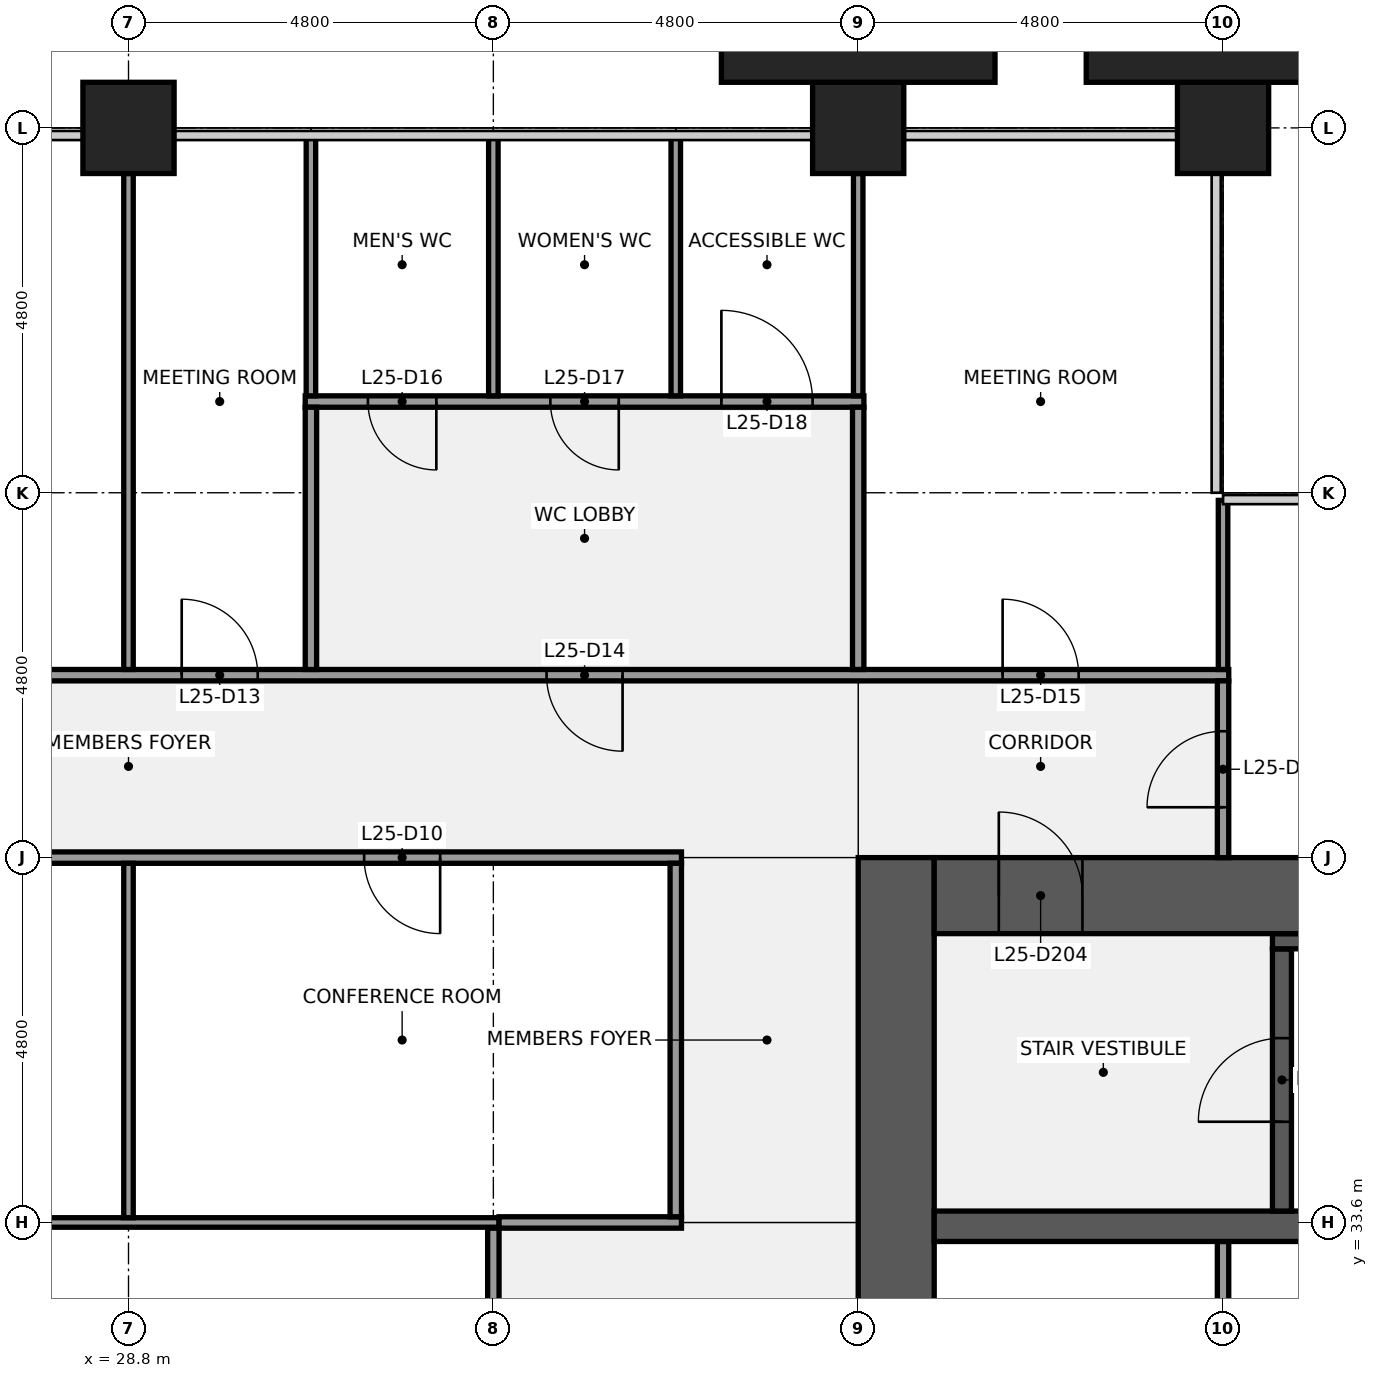
"""IFC4 building model, lengths in metres.
Left out: names, types, materials, properties, quantities, classifications, styles, units other than length and angle.
Written with IfcOpenShell. Run it as: python <this file> out.ifc"""

import sys

from ifc_helpers import new_model, si_unit, direction, frame, frame_2d, origin, origin_2d, place, context, subcontext, project, spatial, rectangle, extrude, element, fill, save


model = new_model("IFC4")
c1 = context("Model", 3, precision=1e-05, world=origin(), true_north=direction((0.0, 1.0)))
c2 = subcontext(c1, "Body", "Model", "MODEL_VIEW")
j1 = project(units=[si_unit("LENGTHUNIT", "METRE"), si_unit("PLANEANGLEUNIT", "RADIAN")], contexts=[c1])
p1 = place(None, origin())
s1 = spatial("IfcSite", under=j1, at=p1, CompositionType="ELEMENT")
p2 = place(p1, origin())
s2 = spatial("IfcBuilding", under=s1, at=p2, CompositionType="ELEMENT")
p3 = place(p2, frame((0.0, 0.0, 120.1)))
s3 = spatial("IfcBuildingStorey", under=s2, at=p3, CompositionType="ELEMENT", Elevation=120.1)
for number, where, z_axis, x_axis in (
    (1, (28.8, 48.0, 0.0), (0.0, 0.0, 1.0), (1.0, 0.0, 0.0)),
    (2, (38.4, 48.0, 0.0), (0.0, 0.0, 1.0), (1.0, 0.0, 0.0)),
    (3, (43.2, 48.0, 0.0), (0.0, 0.0, 1.0), (1.0, 0.0, 0.0)),
):
    element("IfcColumn", number, at=place(p3, frame(where, z_axis=z_axis, x_axis=x_axis)), inside=s3, PredefinedType="COLUMN", context=c2, shape_type="SweptSolid", body=[
        extrude(rectangle(XDim=1.2, YDim=1.2, at=origin_2d()), origin(), (0.0, 0.0, 1.0), 4.0),
    ])
p4 = place(p3, frame((38.9, 9.6, 0.0), z_axis=(0.0, 0.0, 1.0), x_axis=(0.0, 1.0, 0.0)))
e4 = element("IfcWall", 4, at=p4, inside=s3, PredefinedType="SHEAR", context=c2, shape_type="SweptSolid", body=[
    extrude(rectangle(XDim=28.8, YDim=1.0, at=frame_2d((14.4, 0.0))), origin(), (0.0, 0.0, 1.0), 3.84),
])
p5 = place(p4, frame((8.7, 0.0, 0.0)))
e5 = element("IfcOpeningElement", 5, at=p5, cuts=e4, PredefinedType="OPENING", context=c2, shape_type="SweptSolid", body=[
    extrude(rectangle(XDim=1.8, YDim=2.1, at=frame_2d((0.9, 1.05))), frame((0.0, 0.51, 0.0), z_axis=(0.0, -1.0, 0.0), x_axis=(1.0, 0.0, 0.0)), (0.0, 0.0, 1.0), 1.02),
])
p6 = place(p4, frame((18.3, 0.0, 0.0)))
e6 = element("IfcOpeningElement", 6, at=p6, cuts=e4, PredefinedType="OPENING", context=c2, shape_type="SweptSolid", body=[
    extrude(rectangle(XDim=1.8, YDim=2.1, at=frame_2d((0.9, 1.05))), frame((0.0, 0.51, 0.0), z_axis=(0.0, -1.0, 0.0), x_axis=(1.0, 0.0, 0.0)), (0.0, 0.0, 1.0), 1.02),
])
p7 = place(p3, frame((43.2, 30.75, 0.0), z_axis=(0.0, 0.0, 1.0), x_axis=(0.0, 1.0, 0.0)))
e7 = element("IfcWall", 7, at=p7, inside=s3, PredefinedType="PARTITIONING", context=c2, shape_type="SweptSolid", body=[
    extrude(rectangle(XDim=2.6, YDim=0.15, at=frame_2d((1.3, 0.0))), origin(), (0.0, 0.0, 1.0), 3.84),
])
p8 = place(p3, frame((39.4, 33.55, 0.0), z_axis=(0.0, 0.0, 1.0), x_axis=(1.0, 0.0, 0.0)))
e8 = element("IfcWall", 8, at=p8, inside=s3, PredefinedType="SHEAR", context=c2, shape_type="SweptSolid", body=[
    extrude(rectangle(XDim=17.2, YDim=0.4, at=frame_2d((8.6, 0.0))), origin(), (0.0, 0.0, 1.0), 3.84),
])
p9 = place(p3, frame((43.975, 33.75, 0.0), z_axis=(0.0, 0.0, 1.0), x_axis=(0.0, 1.0, 0.0)))
e9 = element("IfcWall", 9, at=p9, inside=s3, PredefinedType="SHEAR", context=c2, shape_type="SweptSolid", body=[
    extrude(rectangle(XDim=3.45, YDim=0.25, at=frame_2d((1.725, 0.0))), origin(), (0.0, 0.0, 1.0), 3.84),
])
p10 = place(p9, frame((1.175, 0.0, 0.0)))
e10 = element("IfcOpeningElement", 10, at=p10, cuts=e9, PredefinedType="OPENING", context=c2, shape_type="SweptSolid", body=[
    extrude(rectangle(XDim=1.1, YDim=2.1, at=frame_2d((0.55, 1.05))), frame((0.0, 0.135, 0.0), z_axis=(0.0, -1.0, 0.0), x_axis=(1.0, 0.0, 0.0)), (0.0, 0.0, 1.0), 0.27),
])
p11 = place(p3, frame((43.85, 37.3, 0.0), z_axis=(0.0, 0.0, 1.0), x_axis=(1.0, 0.0, 0.0)))
e11 = element("IfcWall", 11, at=p11, inside=s3, PredefinedType="SHEAR", context=c2, shape_type="SweptSolid", body=[
    extrude(rectangle(XDim=7.5, YDim=0.2, at=frame_2d((3.75, 0.0))), origin(), (0.0, 0.0, 1.0), 3.84),
])
p12 = place(p3, frame((39.4, 37.9, 0.0), z_axis=(0.0, 0.0, 1.0), x_axis=(1.0, 0.0, 0.0)))
e12 = element("IfcWall", 12, at=p12, inside=s3, PredefinedType="SHEAR", context=c2, shape_type="SweptSolid", body=[
    extrude(rectangle(XDim=13.4, YDim=1.0, at=frame_2d((6.7, 0.0))), origin(), (0.0, 0.0, 1.0), 3.84),
])
p13 = place(p12, frame((0.85, 0.0, 0.0)))
e13 = element("IfcOpeningElement", 13, at=p13, cuts=e12, PredefinedType="OPENING", context=c2, shape_type="SweptSolid", body=[
    extrude(rectangle(XDim=1.1, YDim=2.1, at=frame_2d((0.55, 1.05))), frame((0.0, 0.51, 0.0), z_axis=(0.0, -1.0, 0.0), x_axis=(1.0, 0.0, 0.0)), (0.0, 0.0, 1.0), 1.02),
])
p14 = place(p3, frame((24.075, 33.6, 0.0), z_axis=(0.0, 0.0, 1.0), x_axis=(1.0, 0.0, 0.0)))
e14 = element("IfcWall", 14, at=p14, inside=s3, PredefinedType="PARTITIONING", context=c2, shape_type="SweptSolid", body=[
    extrude(rectangle(XDim=9.6, YDim=0.125, at=frame_2d((4.8, 0.0))), origin(), (0.0, 0.0, 1.0), 2.936),
])
p15 = place(p3, frame((33.675, 33.6, 0.0), z_axis=(0.0, 0.0, 1.0), x_axis=(1.0, 0.0, 0.0)))
e15 = element("IfcWall", 15, at=p15, inside=s3, PredefinedType="PARTITIONING", context=c2, shape_type="SweptSolid", body=[
    extrude(rectangle(XDim=2.4, YDim=0.15, at=frame_2d((1.2, 0.0))), origin(), (0.0, 0.0, 1.0), 2.936),
])
p16 = place(p3, frame((21.525, 38.4, 0.0), z_axis=(0.0, 0.0, 1.0), x_axis=(1.0, 0.0, 0.0)))
e16 = element("IfcWall", 16, at=p16, inside=s3, PredefinedType="PARTITIONING", context=c2, shape_type="SweptSolid", body=[
    extrude(rectangle(XDim=14.55, YDim=0.15, at=frame_2d((7.275, 0.0))), origin(), (0.0, 0.0, 1.0), 2.936),
])
p17 = place(p16, frame((3.175, 0.0, 0.0)))
e17 = element("IfcOpeningElement", 17, at=p17, cuts=e16, PredefinedType="OPENING", context=c2, shape_type="SweptSolid", body=[
    extrude(rectangle(XDim=1.0, YDim=2.1, at=frame_2d((0.5, 1.05))), frame((0.0, 0.085, 0.0), z_axis=(0.0, -1.0, 0.0), x_axis=(1.0, 0.0, 0.0)), (0.0, 0.0, 1.0), 0.17),
])
p18 = place(p16, frame((10.375, 0.0, 0.0)))
e18 = element("IfcOpeningElement", 18, at=p18, cuts=e16, PredefinedType="OPENING", context=c2, shape_type="SweptSolid", body=[
    extrude(rectangle(XDim=1.0, YDim=2.1, at=frame_2d((0.5, 1.05))), frame((0.0, 0.085, 0.0), z_axis=(0.0, -1.0, 0.0), x_axis=(1.0, 0.0, 0.0)), (0.0, 0.0, 1.0), 0.17),
])
p19 = place(p3, frame((14.325, 40.8, 0.0), z_axis=(0.0, 0.0, 1.0), x_axis=(1.0, 0.0, 0.0)))
e19 = element("IfcWall", 19, at=p19, inside=s3, PredefinedType="PARTITIONING", context=c2, shape_type="SweptSolid", body=[
    extrude(rectangle(XDim=28.95, YDim=0.15, at=frame_2d((14.475, 0.0))), origin(), (0.0, 0.0, 1.0), 2.936),
])
p20 = place(p19, frame((1.975, 0.0, 0.0)))
e20 = element("IfcOpeningElement", 20, at=p20, cuts=e19, PredefinedType="OPENING", context=c2, shape_type="SweptSolid", body=[
    extrude(rectangle(XDim=1.0, YDim=2.1, at=frame_2d((0.5, 1.05))), frame((0.0, 0.085, 0.0), z_axis=(0.0, -1.0, 0.0), x_axis=(1.0, 0.0, 0.0)), (0.0, 0.0, 1.0), 0.17),
])
p21 = place(p19, frame((9.175, 0.0, 0.0)))
e21 = element("IfcOpeningElement", 21, at=p21, cuts=e19, PredefinedType="OPENING", context=c2, shape_type="SweptSolid", body=[
    extrude(rectangle(XDim=1.0, YDim=2.1, at=frame_2d((0.5, 1.05))), frame((0.0, 0.085, 0.0), z_axis=(0.0, -1.0, 0.0), x_axis=(1.0, 0.0, 0.0)), (0.0, 0.0, 1.0), 0.17),
])
p22 = place(p19, frame((15.175, 0.0, 0.0)))
e22 = element("IfcOpeningElement", 22, at=p22, cuts=e19, PredefinedType="OPENING", context=c2, shape_type="SweptSolid", body=[
    extrude(rectangle(XDim=1.0, YDim=2.1, at=frame_2d((0.5, 1.05))), frame((0.0, 0.085, 0.0), z_axis=(0.0, -1.0, 0.0), x_axis=(1.0, 0.0, 0.0)), (0.0, 0.0, 1.0), 0.17),
])
p23 = place(p19, frame((19.975, 0.0, 0.0)))
e23 = element("IfcOpeningElement", 23, at=p23, cuts=e19, PredefinedType="OPENING", context=c2, shape_type="SweptSolid", body=[
    extrude(rectangle(XDim=1.0, YDim=2.1, at=frame_2d((0.5, 1.05))), frame((0.0, 0.085, 0.0), z_axis=(0.0, -1.0, 0.0), x_axis=(1.0, 0.0, 0.0)), (0.0, 0.0, 1.0), 0.17),
])
p24 = place(p19, frame((25.975, 0.0, 0.0)))
e24 = element("IfcOpeningElement", 24, at=p24, cuts=e19, PredefinedType="OPENING", context=c2, shape_type="SweptSolid", body=[
    extrude(rectangle(XDim=1.0, YDim=2.1, at=frame_2d((0.5, 1.05))), frame((0.0, 0.085, 0.0), z_axis=(0.0, -1.0, 0.0), x_axis=(1.0, 0.0, 0.0)), (0.0, 0.0, 1.0), 0.17),
])
p25 = place(p3, frame((31.125, 44.4, 0.0), z_axis=(0.0, 0.0, 1.0), x_axis=(1.0, 0.0, 0.0)))
e25 = element("IfcWall", 25, at=p25, inside=s3, PredefinedType="PARTITIONING", context=c2, shape_type="SweptSolid", body=[
    extrude(rectangle(XDim=7.35, YDim=0.15, at=frame_2d((3.675, 0.0))), origin(), (0.0, 0.0, 1.0), 2.936),
])
p26 = place(p25, frame((0.825, 0.0, 0.0)))
e26 = element("IfcOpeningElement", 26, at=p26, cuts=e25, PredefinedType="OPENING", context=c2, shape_type="SweptSolid", body=[
    extrude(rectangle(XDim=0.9, YDim=2.1, at=frame_2d((0.45, 1.05))), frame((0.0, 0.085, 0.0), z_axis=(0.0, -1.0, 0.0), x_axis=(1.0, 0.0, 0.0)), (0.0, 0.0, 1.0), 0.17),
])
p27 = place(p25, frame((3.225, 0.0, 0.0)))
e27 = element("IfcOpeningElement", 27, at=p27, cuts=e25, PredefinedType="OPENING", context=c2, shape_type="SweptSolid", body=[
    extrude(rectangle(XDim=0.9, YDim=2.1, at=frame_2d((0.45, 1.05))), frame((0.0, 0.085, 0.0), z_axis=(0.0, -1.0, 0.0), x_axis=(1.0, 0.0, 0.0)), (0.0, 0.0, 1.0), 0.17),
])
p28 = place(p25, frame((5.475, 0.0, 0.0)))
e28 = element("IfcOpeningElement", 28, at=p28, cuts=e25, PredefinedType="OPENING", context=c2, shape_type="SweptSolid", body=[
    extrude(rectangle(XDim=1.2, YDim=2.1, at=frame_2d((0.6, 1.05))), frame((0.0, 0.085, 0.0), z_axis=(0.0, -1.0, 0.0), x_axis=(1.0, 0.0, 0.0)), (0.0, 0.0, 1.0), 0.17),
])
p29 = place(p3, frame((28.8, 33.663, 0.0), z_axis=(0.0, 0.0, 1.0), x_axis=(0.0, 1.0, 0.0)))
e29 = element("IfcWall", 29, at=p29, inside=s3, PredefinedType="PARTITIONING", context=c2, shape_type="SweptSolid", body=[
    extrude(rectangle(XDim=4.662, YDim=0.125, at=frame_2d((2.331, 0.0))), origin(), (0.0, 0.0, 1.0), 2.936),
])
p30 = place(p3, frame((28.8, 40.875, 0.0), z_axis=(0.0, 0.0, 1.0), x_axis=(0.0, 1.0, 0.0)))
e30 = element("IfcWall", 30, at=p30, inside=s3, PredefinedType="PARTITIONING", context=c2, shape_type="SweptSolid", body=[
    extrude(rectangle(XDim=6.525, YDim=0.125, at=frame_2d((3.262, 0.0))), origin(), (0.0, 0.0, 1.0), 2.936),
])
p31 = place(p3, frame((31.2, 44.475, 0.0), z_axis=(0.0, 0.0, 1.0), x_axis=(0.0, 1.0, 0.0)))
e31 = element("IfcWall", 31, at=p31, inside=s3, PredefinedType="PARTITIONING", context=c2, shape_type="SweptSolid", body=[
    extrude(rectangle(XDim=3.425, YDim=0.125, at=frame_2d((1.712, 0.0))), origin(), (0.0, 0.0, 1.0), 2.936),
])
p32 = place(p3, frame((31.2, 40.875, 0.0), z_axis=(0.0, 0.0, 1.0), x_axis=(0.0, 1.0, 0.0)))
e32 = element("IfcWall", 32, at=p32, inside=s3, PredefinedType="PARTITIONING", context=c2, shape_type="SweptSolid", body=[
    extrude(rectangle(XDim=3.45, YDim=0.15, at=frame_2d((1.725, 0.0))), origin(), (0.0, 0.0, 1.0), 2.936),
])
p33 = place(p3, frame((33.6, 44.475, 0.0), z_axis=(0.0, 0.0, 1.0), x_axis=(0.0, 1.0, 0.0)))
e33 = element("IfcWall", 33, at=p33, inside=s3, PredefinedType="PARTITIONING", context=c2, shape_type="SweptSolid", body=[
    extrude(rectangle(XDim=3.425, YDim=0.125, at=frame_2d((1.712, 0.0))), origin(), (0.0, 0.0, 1.0), 2.936),
])
p34 = place(p3, frame((33.6, 26.475, 0.0), z_axis=(0.0, 0.0, 1.0), x_axis=(0.0, 1.0, 0.0)))
e34 = element("IfcWall", 34, at=p34, inside=s3, PredefinedType="PARTITIONING", context=c2, shape_type="SweptSolid", body=[
    extrude(rectangle(XDim=7.05, YDim=0.15, at=frame_2d((3.525, 0.0))), origin(), (0.0, 0.0, 1.0), 2.936),
])
p35 = place(p3, frame((36.0, 44.475, 0.0), z_axis=(0.0, 0.0, 1.0), x_axis=(0.0, 1.0, 0.0)))
e35 = element("IfcWall", 35, at=p35, inside=s3, PredefinedType="PARTITIONING", context=c2, shape_type="SweptSolid", body=[
    extrude(rectangle(XDim=3.425, YDim=0.125, at=frame_2d((1.712, 0.0))), origin(), (0.0, 0.0, 1.0), 2.936),
])
p36 = place(p3, frame((36.0, 33.675, 0.0), z_axis=(0.0, 0.0, 1.0), x_axis=(0.0, 1.0, 0.0)))
e36 = element("IfcWall", 36, at=p36, inside=s3, PredefinedType="PARTITIONING", context=c2, shape_type="SweptSolid", body=[
    extrude(rectangle(XDim=4.65, YDim=0.15, at=frame_2d((2.325, 0.0))), origin(), (0.0, 0.0, 1.0), 2.936),
])
p37 = place(p3, frame((38.4, 44.475, 0.0), z_axis=(0.0, 0.0, 1.0), x_axis=(0.0, 1.0, 0.0)))
e37 = element("IfcWall", 37, at=p37, inside=s3, PredefinedType="PARTITIONING", context=c2, shape_type="SweptSolid", body=[
    extrude(rectangle(XDim=2.925, YDim=0.125, at=frame_2d((1.462, 0.0))), origin(), (0.0, 0.0, 1.0), 2.936),
])
p38 = place(p3, frame((38.4, 40.875, 0.0), z_axis=(0.0, 0.0, 1.0), x_axis=(0.0, 1.0, 0.0)))
e38 = element("IfcWall", 38, at=p38, inside=s3, PredefinedType="PARTITIONING", context=c2, shape_type="SweptSolid", body=[
    extrude(rectangle(XDim=3.45, YDim=0.15, at=frame_2d((1.725, 0.0))), origin(), (0.0, 0.0, 1.0), 2.936),
])
p39 = place(p3, frame((43.2, 40.875, 0.0), z_axis=(0.0, 0.0, 1.0), x_axis=(0.0, 1.0, 0.0)))
e39 = element("IfcWall", 39, at=p39, inside=s3, PredefinedType="PARTITIONING", context=c2, shape_type="SweptSolid", body=[
    extrude(rectangle(XDim=2.225, YDim=0.125, at=frame_2d((1.113, 0.0))), origin(), (0.0, 0.0, 1.0), 2.936),
])
p40 = place(p3, frame((43.2, 38.4, 0.0), z_axis=(0.0, 0.0, 1.0), x_axis=(0.0, 1.0, 0.0)))
e40 = element("IfcWall", 40, at=p40, inside=s3, PredefinedType="PARTITIONING", context=c2, shape_type="SweptSolid", body=[
    extrude(rectangle(XDim=2.325, YDim=0.15, at=frame_2d((1.163, 0.0))), origin(), (0.0, 0.0, 1.0), 2.936),
])
p41 = place(p40, frame((0.663, 0.0, 0.0)))
e41 = element("IfcOpeningElement", 41, at=p41, cuts=e40, PredefinedType="OPENING", context=c2, shape_type="SweptSolid", body=[
    extrude(rectangle(XDim=1.0, YDim=2.1, at=frame_2d((0.5, 1.05))), frame((0.0, 0.085, 0.0), z_axis=(0.0, -1.0, 0.0), x_axis=(1.0, 0.0, 0.0)), (0.0, 0.0, 1.0), 0.17),
])
for number, where, z_axis, x_axis in (
    (42, (38.4, 49.05, 0.0), (0.0, 0.0, 1.0), (1.0, 0.0, 0.0)),
    (43, (43.2, 49.05, 0.0), (0.0, 0.0, 1.0), (1.0, 0.0, 0.0)),
):
    element("IfcColumn", number, at=place(p3, frame(where, z_axis=z_axis, x_axis=x_axis)), inside=s3, PredefinedType="PILASTER", context=c2, shape_type="SweptSolid", body=[
        extrude(rectangle(XDim=3.6, YDim=0.9, at=origin_2d()), origin(), (0.0, 0.0, 1.0), 4.0),
    ])
p42 = place(p10, origin())
e44 = element("IfcDoor", 44, at=p42, inside=s3, OperationType="SINGLE_SWING_LEFT", PredefinedType="DOOR", context=c2, shape_type="SweptSolid", body=[
    extrude(rectangle(XDim=1.1, YDim=2.1, at=frame_2d((0.55, 1.05))), frame((0.0, 0.025, 0.0), z_axis=(0.0, -1.0, 0.0), x_axis=(1.0, 0.0, 0.0)), (0.0, 0.0, 1.0), 0.05),
])
fill(e10, e44)
p43 = place(p13, origin())
e45 = element("IfcDoor", 45, at=p43, inside=s3, OperationType="SINGLE_SWING_LEFT", PredefinedType="DOOR", context=c2, shape_type="SweptSolid", body=[
    extrude(rectangle(XDim=1.1, YDim=2.1, at=frame_2d((0.55, 1.05))), frame((0.0, 0.025, 0.0), z_axis=(0.0, -1.0, 0.0), x_axis=(1.0, 0.0, 0.0)), (0.0, 0.0, 1.0), 0.05),
])
fill(e13, e45)
p44 = place(p18, origin())
e46 = element("IfcDoor", 46, at=p44, inside=s3, OperationType="SINGLE_SWING_RIGHT", PredefinedType="DOOR", context=c2, shape_type="SweptSolid", body=[
    extrude(rectangle(XDim=1.0, YDim=2.1, at=frame_2d((0.5, 1.05))), frame((0.0, 0.025, 0.0), z_axis=(0.0, -1.0, 0.0), x_axis=(1.0, 0.0, 0.0)), (0.0, 0.0, 1.0), 0.05),
])
fill(e18, e46)
p45 = place(p22, origin())
e47 = element("IfcDoor", 47, at=p45, inside=s3, OperationType="SINGLE_SWING_LEFT", PredefinedType="DOOR", context=c2, shape_type="SweptSolid", body=[
    extrude(rectangle(XDim=1.0, YDim=2.1, at=frame_2d((0.5, 1.05))), frame((0.0, 0.025, 0.0), z_axis=(0.0, -1.0, 0.0), x_axis=(1.0, 0.0, 0.0)), (0.0, 0.0, 1.0), 0.05),
])
fill(e22, e47)
p46 = place(p23, origin())
e48 = element("IfcDoor", 48, at=p46, inside=s3, OperationType="SINGLE_SWING_RIGHT", PredefinedType="DOOR", context=c2, shape_type="SweptSolid", body=[
    extrude(rectangle(XDim=1.0, YDim=2.1, at=frame_2d((0.5, 1.05))), frame((0.0, 0.025, 0.0), z_axis=(0.0, -1.0, 0.0), x_axis=(1.0, 0.0, 0.0)), (0.0, 0.0, 1.0), 0.05),
])
fill(e23, e48)
p47 = place(p24, origin())
e49 = element("IfcDoor", 49, at=p47, inside=s3, OperationType="SINGLE_SWING_LEFT", PredefinedType="DOOR", context=c2, shape_type="SweptSolid", body=[
    extrude(rectangle(XDim=1.0, YDim=2.1, at=frame_2d((0.5, 1.05))), frame((0.0, 0.025, 0.0), z_axis=(0.0, -1.0, 0.0), x_axis=(1.0, 0.0, 0.0)), (0.0, 0.0, 1.0), 0.05),
])
fill(e24, e49)
p48 = place(p26, origin())
e50 = element("IfcDoor", 50, at=p48, inside=s3, OperationType="SINGLE_SWING_RIGHT", PredefinedType="DOOR", context=c2, shape_type="SweptSolid", body=[
    extrude(rectangle(XDim=0.9, YDim=2.1, at=frame_2d((0.45, 1.05))), frame((0.0, 0.025, 0.0), z_axis=(0.0, -1.0, 0.0), x_axis=(1.0, 0.0, 0.0)), (0.0, 0.0, 1.0), 0.05),
])
fill(e26, e50)
p49 = place(p27, origin())
e51 = element("IfcDoor", 51, at=p49, inside=s3, OperationType="SINGLE_SWING_RIGHT", PredefinedType="DOOR", context=c2, shape_type="SweptSolid", body=[
    extrude(rectangle(XDim=0.9, YDim=2.1, at=frame_2d((0.45, 1.05))), frame((0.0, 0.025, 0.0), z_axis=(0.0, -1.0, 0.0), x_axis=(1.0, 0.0, 0.0)), (0.0, 0.0, 1.0), 0.05),
])
fill(e27, e51)
p50 = place(p28, origin())
e52 = element("IfcDoor", 52, at=p50, inside=s3, OperationType="SINGLE_SWING_LEFT", PredefinedType="DOOR", context=c2, shape_type="SweptSolid", body=[
    extrude(rectangle(XDim=1.2, YDim=2.1, at=frame_2d((0.6, 1.05))), frame((0.0, 0.025, 0.0), z_axis=(0.0, -1.0, 0.0), x_axis=(1.0, 0.0, 0.0)), (0.0, 0.0, 1.0), 0.05),
])
fill(e28, e52)
p51 = place(p41, origin())
e53 = element("IfcDoor", 53, at=p51, inside=s3, OperationType="SINGLE_SWING_LEFT", PredefinedType="DOOR", context=c2, shape_type="SweptSolid", body=[
    extrude(rectangle(XDim=1.0, YDim=2.1, at=frame_2d((0.5, 1.05))), frame((0.0, 0.025, 0.0), z_axis=(0.0, -1.0, 0.0), x_axis=(1.0, 0.0, 0.0)), (0.0, 0.0, 1.0), 0.05),
])
fill(e41, e53)
save(model, sys.argv[1])
